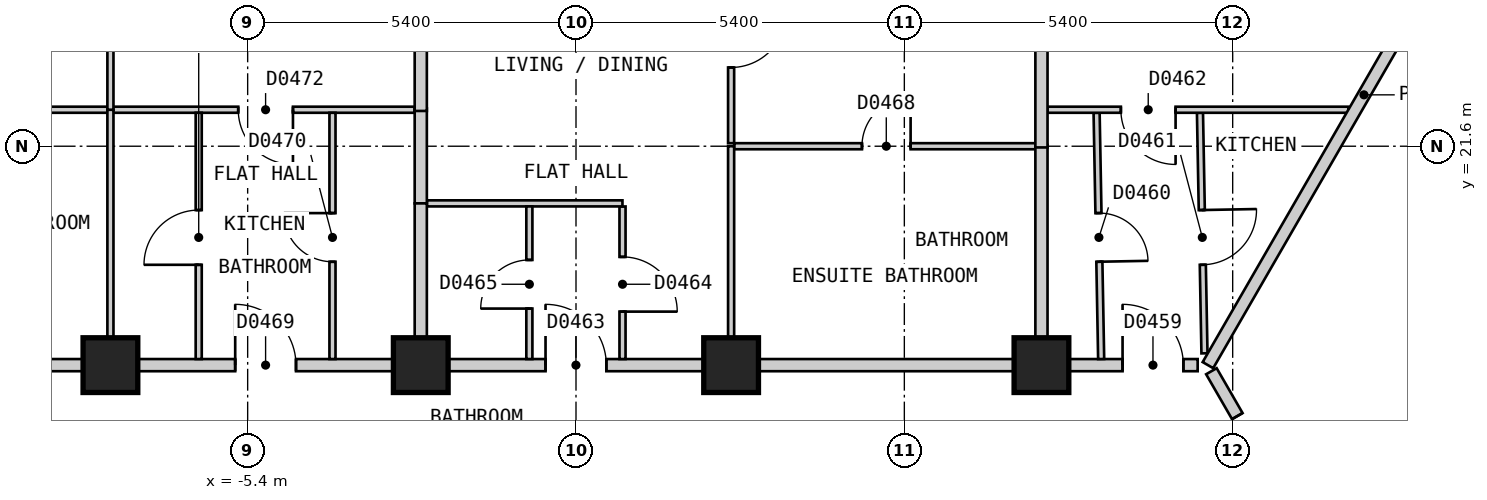
"""IFC4 building model, lengths in metres.
Left out: names, types, materials, properties, quantities, classifications, styles, units other than length and angle.
Written with IfcOpenShell. Run it as: python <this file> out.ifc"""

import sys

from ifc_helpers import new_model, si_unit, direction, frame, frame_2d, origin, origin_2d, place, context, subcontext, project, spatial, rectangle, extrude, element, fill, save


model = new_model("IFC4")
c1 = context("Model", 3, precision=1e-05, world=origin(), true_north=direction((0.0, 1.0)))
c2 = subcontext(c1, "Body", "Model", "MODEL_VIEW")
j1 = project(units=[si_unit("LENGTHUNIT", "METRE"), si_unit("PLANEANGLEUNIT", "RADIAN")], contexts=[c1])
p1 = place(None, origin())
s1 = spatial("IfcSite", under=j1, at=p1, CompositionType="ELEMENT")
p2 = place(p1, origin())
s2 = spatial("IfcBuilding", under=s1, at=p2, CompositionType="ELEMENT")
p3 = place(p2, frame((0.0, 0.0, 26.4)))
s3 = spatial("IfcBuildingStorey", under=s2, at=p3, CompositionType="ELEMENT", Elevation=26.4)
for number, where, z_axis, x_axis in (
    (1, (7.655, 18.0, 0.0), (0.0, 0.0, 1.0), (-1.0, 0.0, 0.0)),
    (2, (2.551, 18.0, 0.0), (0.0, 0.0, 1.0), (-1.0, 0.0, 0.0)),
    (3, (-2.553, 18.0, 0.0), (0.0, 0.0, 1.0), (-1.0, 0.0, 0.0)),
    (4, (-7.657, 18.0, 0.0), (0.0, 0.0, 1.0), (-1.0, 0.0, 0.0)),
):
    element("IfcColumn", number, at=place(p3, frame(where, z_axis=z_axis, x_axis=x_axis)), inside=s3, PredefinedType="COLUMN", context=c2, shape_type="SweptSolid", body=[
        extrude(rectangle(XDim=0.9, YDim=0.9, at=origin_2d()), origin(), (0.0, 0.0, 1.0), 3.0),
    ])
p4 = place(p3, frame((10.45, 17.9, 0.0), z_axis=(0.0, 0.0, 1.0), x_axis=(0.500034352617, -0.866005569383, 0.0)))
e5 = element("IfcWall", 5, at=p4, inside=s3, PredefinedType="PARTITIONING", context=c2, shape_type="SweptSolid", body=[
    extrude(rectangle(XDim=20.553, YDim=0.2, at=frame_2d((10.276, 0.0))), origin(), (0.0, 0.0, 1.0), 2.7),
])
p5 = place(p4, frame((9.775, 0.0, 0.0)))
e6 = element("IfcOpeningElement", 6, at=p5, cuts=e5, PredefinedType="OPENING", context=c2, shape_type="SweptSolid", body=[
    extrude(rectangle(XDim=1.0, YDim=2.1, at=frame_2d((0.5, 1.05))), frame((0.0, 0.11, 0.0), z_axis=(0.0, -1.0, 0.0), x_axis=(1.0, 0.0, 0.0)), (0.0, 0.0, 1.0), 0.22),
])
p6 = place(p4, frame((0.852, 0.0, 0.0)))
e7 = element("IfcOpeningElement", 7, at=p6, cuts=e5, PredefinedType="OPENING", context=c2, shape_type="SweptSolid", body=[
    extrude(rectangle(XDim=0.8, YDim=2.1, at=frame_2d((0.4, 1.05))), frame((0.0, 0.11, 0.0), z_axis=(0.0, -1.0, 0.0), x_axis=(1.0, 0.0, 0.0)), (0.0, 0.0, 1.0), 0.22),
])
p7 = place(p3, frame((-10.276, 18.0, 0.0), z_axis=(0.0, 0.0, 1.0), x_axis=(1.0, 0.0, 0.0)))
e8 = element("IfcWall", 8, at=p7, inside=s3, PredefinedType="PARTITIONING", context=c2, shape_type="SweptSolid", body=[
    extrude(rectangle(XDim=20.5, YDim=0.2, at=frame_2d((10.25, 0.0))), origin(), (0.0, 0.0, 1.0), 2.7),
])
p8 = place(p7, frame((19.265, 0.0, 0.0)))
e9 = element("IfcOpeningElement", 9, at=p8, cuts=e8, PredefinedType="OPENING", context=c2, shape_type="SweptSolid", body=[
    extrude(rectangle(XDim=1.0, YDim=2.1, at=frame_2d((0.5, 1.05))), frame((0.0, 0.11, 0.0), z_axis=(0.0, -1.0, 0.0), x_axis=(1.0, 0.0, 0.0)), (0.0, 0.0, 1.0), 0.22),
])
p9 = place(p7, frame((9.775, 0.0, 0.0)))
e10 = element("IfcOpeningElement", 10, at=p9, cuts=e8, PredefinedType="OPENING", context=c2, shape_type="SweptSolid", body=[
    extrude(rectangle(XDim=1.0, YDim=2.1, at=frame_2d((0.5, 1.05))), frame((0.0, 0.11, 0.0), z_axis=(0.0, -1.0, 0.0), x_axis=(1.0, 0.0, 0.0)), (0.0, 0.0, 1.0), 0.22),
])
p10 = place(p7, frame((4.671, 0.0, 0.0)))
e11 = element("IfcOpeningElement", 11, at=p10, cuts=e8, PredefinedType="OPENING", context=c2, shape_type="SweptSolid", body=[
    extrude(rectangle(XDim=1.0, YDim=2.1, at=frame_2d((0.5, 1.05))), frame((0.0, 0.11, 0.0), z_axis=(0.0, -1.0, 0.0), x_axis=(1.0, 0.0, 0.0)), (0.0, 0.0, 1.0), 0.22),
])
p11 = place(p3, frame((8.562, 22.15, 0.0), z_axis=(0.0, 0.0, 1.0), x_axis=(0.018504185939, -0.999828782894, 0.0)))
e12 = element("IfcWall", 12, at=p11, inside=s3, PredefinedType="PARTITIONING", context=c2, shape_type="SweptSolid", body=[
    extrude(rectangle(XDim=4.051, YDim=0.1, at=frame_2d((2.025, 0.0))), origin(), (0.0, 0.0, 1.0), 2.7),
])
p12 = place(p11, frame((1.65, 0.0, 0.0)))
e13 = element("IfcOpeningElement", 13, at=p12, cuts=e12, PredefinedType="OPENING", context=c2, shape_type="SweptSolid", body=[
    extrude(rectangle(XDim=0.8, YDim=2.1, at=frame_2d((0.4, 1.05))), frame((0.0, 0.06, 0.0), z_axis=(0.0, -1.0, 0.0), x_axis=(1.0, 0.0, 0.0)), (0.0, 0.0, 1.0), 0.12),
])
p13 = place(p3, frame((10.262, 22.15, 0.0), z_axis=(0.0, 0.0, 1.0), x_axis=(0.018696971826, -0.999825196344, 0.0)))
e14 = element("IfcWall", 14, at=p13, inside=s3, PredefinedType="PARTITIONING", context=c2, shape_type="SweptSolid", body=[
    extrude(rectangle(XDim=3.957, YDim=0.1, at=frame_2d((1.978, 0.0))), origin(), (0.0, 0.0, 1.0), 2.7),
])
p14 = place(p13, frame((1.6, 0.0, 0.0)))
e15 = element("IfcOpeningElement", 15, at=p14, cuts=e14, PredefinedType="OPENING", context=c2, shape_type="SweptSolid", body=[
    extrude(rectangle(XDim=0.9, YDim=2.1, at=frame_2d((0.45, 1.05))), frame((0.0, 0.06, 0.0), z_axis=(0.0, -1.0, 0.0), x_axis=(1.0, 0.0, 0.0)), (0.0, 0.0, 1.0), 0.12),
])
p15 = place(p3, frame((0.765, 20.609, 0.0), z_axis=(0.0, 0.0, 1.0), x_axis=(0.0, -1.0, 0.0)))
e16 = element("IfcWall", 16, at=p15, inside=s3, PredefinedType="PARTITIONING", context=c2, shape_type="SweptSolid", body=[
    extrude(rectangle(XDim=2.509, YDim=0.1, at=frame_2d((1.254, 0.0))), origin(), (0.0, 0.0, 1.0), 2.7),
])
p16 = place(p15, frame((0.829, 0.0, 0.0)))
e17 = element("IfcOpeningElement", 17, at=p16, cuts=e16, PredefinedType="OPENING", context=c2, shape_type="SweptSolid", body=[
    extrude(rectangle(XDim=0.9, YDim=2.1, at=frame_2d((0.45, 1.05))), frame((0.0, 0.06, 0.0), z_axis=(0.0, -1.0, 0.0), x_axis=(1.0, 0.0, 0.0)), (0.0, 0.0, 1.0), 0.12),
])
p17 = place(p3, frame((2.551, 25.04, 0.0), z_axis=(0.0, 0.0, 1.0), x_axis=(0.0, -1.0, 0.0)))
e18 = element("IfcWall", 18, at=p17, inside=s3, PredefinedType="PARTITIONING", context=c2, shape_type="SweptSolid", body=[
    extrude(rectangle(XDim=3.39, YDim=0.1, at=frame_2d((1.695, 0.0))), origin(), (0.0, 0.0, 1.0), 2.7),
])
p18 = place(p17, frame((1.245, 0.0, 0.0)))
e19 = element("IfcOpeningElement", 19, at=p18, cuts=e18, PredefinedType="OPENING", context=c2, shape_type="SweptSolid", body=[
    extrude(rectangle(XDim=0.9, YDim=2.1, at=frame_2d((0.45, 1.05))), frame((0.0, 0.06, 0.0), z_axis=(0.0, -1.0, 0.0), x_axis=(1.0, 0.0, 0.0)), (0.0, 0.0, 1.0), 0.12),
])
p19 = place(p3, frame((-2.453, 20.66, 0.0), z_axis=(0.0, 0.0, 1.0), x_axis=(1.0, 0.0, 0.0)))
e20 = element("IfcWall", 20, at=p19, inside=s3, PredefinedType="PARTITIONING", context=c2, shape_type="SweptSolid", body=[
    extrude(rectangle(XDim=3.217, YDim=0.1, at=frame_2d((1.608, 0.0))), origin(), (0.0, 0.0, 1.0), 2.7),
])
p20 = place(p3, frame((2.601, 21.6, 0.0), z_axis=(0.0, 0.0, 1.0), x_axis=(1.0, 0.0, 0.0)))
e21 = element("IfcWall", 21, at=p20, inside=s3, PredefinedType="PARTITIONING", context=c2, shape_type="SweptSolid", body=[
    extrude(rectangle(XDim=4.954, YDim=0.1, at=frame_2d((2.477, 0.0))), origin(), (0.0, 0.0, 1.0), 2.7),
])
p21 = place(p20, frame((2.102, 0.0, 0.0)))
e22 = element("IfcOpeningElement", 22, at=p21, cuts=e21, PredefinedType="OPENING", context=c2, shape_type="SweptSolid", body=[
    extrude(rectangle(XDim=0.8, YDim=2.1, at=frame_2d((0.4, 1.05))), frame((0.0, 0.06, 0.0), z_axis=(0.0, -1.0, 0.0), x_axis=(1.0, 0.0, 0.0)), (0.0, 0.0, 1.0), 0.12),
])
p22 = place(p3, frame((-12.711, 22.2, 0.0), z_axis=(0.0, 0.0, 1.0), x_axis=(1.0, 0.0, 0.0)))
e23 = element("IfcWall", 23, at=p22, inside=s3, PredefinedType="PARTITIONING", context=c2, shape_type="SweptSolid", body=[
    extrude(rectangle(XDim=10.058, YDim=0.1, at=frame_2d((5.029, 0.0))), origin(), (0.0, 0.0, 1.0), 2.7),
])
p23 = place(p22, frame((7.156, 0.0, 0.0)))
e24 = element("IfcOpeningElement", 24, at=p23, cuts=e23, PredefinedType="OPENING", context=c2, shape_type="SweptSolid", body=[
    extrude(rectangle(XDim=0.9, YDim=2.1, at=frame_2d((0.45, 1.05))), frame((0.0, 0.06, 0.0), z_axis=(0.0, -1.0, 0.0), x_axis=(1.0, 0.0, 0.0)), (0.0, 0.0, 1.0), 0.12),
])
p24 = place(p22, frame((2.102, 0.0, 0.0)))
e25 = element("IfcOpeningElement", 25, at=p24, cuts=e23, PredefinedType="OPENING", context=c2, shape_type="SweptSolid", body=[
    extrude(rectangle(XDim=0.8, YDim=2.1, at=frame_2d((0.4, 1.05))), frame((0.0, 0.06, 0.0), z_axis=(0.0, -1.0, 0.0), x_axis=(1.0, 0.0, 0.0)), (0.0, 0.0, 1.0), 0.12),
])
p25 = place(p3, frame((7.755, 22.2, 0.0), z_axis=(0.0, 0.0, 1.0), x_axis=(1.0, 0.0, 0.0)))
e26 = element("IfcWall", 26, at=p25, inside=s3, PredefinedType="PARTITIONING", context=c2, shape_type="SweptSolid", body=[
    extrude(rectangle(XDim=4.947, YDim=0.1, at=frame_2d((2.474, 0.0))), origin(), (0.0, 0.0, 1.0), 2.7),
])
p26 = place(p25, frame((1.206, 0.0, 0.0)))
e27 = element("IfcOpeningElement", 27, at=p26, cuts=e26, PredefinedType="OPENING", context=c2, shape_type="SweptSolid", body=[
    extrude(rectangle(XDim=0.9, YDim=2.1, at=frame_2d((0.45, 1.05))), frame((0.0, 0.06, 0.0), z_axis=(0.0, -1.0, 0.0), x_axis=(1.0, 0.0, 0.0)), (0.0, 0.0, 1.0), 0.12),
])
p27 = place(p3, frame((2.551, 18.1, 0.0), z_axis=(0.0, 0.0, 1.0), x_axis=(0.0, 1.0, 0.0)))
e28 = element("IfcWall", 28, at=p27, inside=s3, PredefinedType="PARTITIONING", context=c2, shape_type="SweptSolid", body=[
    extrude(rectangle(XDim=3.5, YDim=0.1, at=frame_2d((1.75, 0.0))), origin(), (0.0, 0.0, 1.0), 2.7),
])
p28 = place(p3, frame((-4.005, 18.1, 0.0), z_axis=(0.0, 0.0, 1.0), x_axis=(0.0, 1.0, 0.0)))
e29 = element("IfcWall", 29, at=p28, inside=s3, PredefinedType="PARTITIONING", context=c2, shape_type="SweptSolid", body=[
    extrude(rectangle(XDim=4.05, YDim=0.1, at=frame_2d((2.025, 0.0))), origin(), (0.0, 0.0, 1.0), 2.7),
])
p29 = place(p28, frame((1.6, 0.0, 0.0)))
e30 = element("IfcOpeningElement", 30, at=p29, cuts=e29, PredefinedType="OPENING", context=c2, shape_type="SweptSolid", body=[
    extrude(rectangle(XDim=0.8, YDim=2.1, at=frame_2d((0.4, 1.05))), frame((0.0, 0.06, 0.0), z_axis=(0.0, -1.0, 0.0), x_axis=(1.0, 0.0, 0.0)), (0.0, 0.0, 1.0), 0.12),
])
p30 = place(p3, frame((-6.205, 18.1, 0.0), z_axis=(0.0, 0.0, 1.0), x_axis=(0.0, 1.0, 0.0)))
e31 = element("IfcWall", 31, at=p30, inside=s3, PredefinedType="PARTITIONING", context=c2, shape_type="SweptSolid", body=[
    extrude(rectangle(XDim=4.05, YDim=0.1, at=frame_2d((2.025, 0.0))), origin(), (0.0, 0.0, 1.0), 2.7),
])
p31 = place(p30, frame((1.55, 0.0, 0.0)))
e32 = element("IfcOpeningElement", 32, at=p31, cuts=e31, PredefinedType="OPENING", context=c2, shape_type="SweptSolid", body=[
    extrude(rectangle(XDim=0.9, YDim=2.1, at=frame_2d((0.45, 1.05))), frame((0.0, 0.06, 0.0), z_axis=(0.0, -1.0, 0.0), x_axis=(1.0, 0.0, 0.0)), (0.0, 0.0, 1.0), 0.12),
])
p32 = place(p3, frame((-7.657, 18.1, 0.0), z_axis=(0.0, 0.0, 1.0), x_axis=(0.0, 1.0, 0.0)))
e33 = element("IfcWall", 33, at=p32, inside=s3, PredefinedType="PARTITIONING", context=c2, shape_type="SweptSolid", body=[
    extrude(rectangle(XDim=4.1, YDim=0.1, at=frame_2d((2.05, 0.0))), origin(), (0.0, 0.0, 1.0), 2.7),
])
p33 = place(p3, frame((-0.767, 18.1, 0.0), z_axis=(0.0, 0.0, 1.0), x_axis=(0.0, 1.0, 0.0)))
e34 = element("IfcWall", 34, at=p33, inside=s3, PredefinedType="PARTITIONING", context=c2, shape_type="SweptSolid", body=[
    extrude(rectangle(XDim=2.51, YDim=0.1, at=frame_2d((1.255, 0.0))), origin(), (0.0, 0.0, 1.0), 2.7),
])
p34 = place(p33, frame((0.83, 0.0, 0.0)))
e35 = element("IfcOpeningElement", 35, at=p34, cuts=e34, PredefinedType="OPENING", context=c2, shape_type="SweptSolid", body=[
    extrude(rectangle(XDim=0.8, YDim=2.1, at=frame_2d((0.4, 1.05))), frame((0.0, 0.06, 0.0), z_axis=(0.0, -1.0, 0.0), x_axis=(1.0, 0.0, 0.0)), (0.0, 0.0, 1.0), 0.12),
])
p35 = place(p3, frame((-2.553, 22.22, 0.0), z_axis=(0.0, 0.0, 1.0), x_axis=(0.0, -1.0, 0.0)))
e36 = element("IfcWall", 36, at=p35, inside=s3, PredefinedType="PARTITIONING", context=c2, shape_type="SweptSolid", body=[
    extrude(rectangle(XDim=1.56, YDim=0.2, at=frame_2d((0.78, 0.0))), origin(), (0.0, 0.0, 1.0), 2.7),
])
p36 = place(p3, frame((7.655, 21.62, 0.0), z_axis=(0.0, 0.0, 1.0), x_axis=(0.0, -1.0, 0.0)))
e37 = element("IfcWall", 37, at=p36, inside=s3, PredefinedType="PARTITIONING", context=c2, shape_type="SweptSolid", body=[
    extrude(rectangle(XDim=3.52, YDim=0.2, at=frame_2d((1.76, 0.0))), origin(), (0.0, 0.0, 1.0), 2.7),
])
p37 = place(p3, frame((10.393, 18.0, 0.0), z_axis=(0.0, 0.0, 1.0), x_axis=(0.499945497007, 0.866056868816, 0.0)))
e38 = element("IfcWall", 38, at=p37, inside=s3, PredefinedType="PARTITIONING", context=c2, shape_type="SweptSolid", body=[
    extrude(rectangle(XDim=10.265, YDim=0.2, at=frame_2d((5.132, 0.0))), origin(), (0.0, 0.0, 1.0), 2.7),
])
p38 = place(p3, frame((7.655, 21.58, 0.0), z_axis=(0.0, 0.0, 1.0), x_axis=(0.0, 1.0, 0.0)))
e39 = element("IfcWall", 39, at=p38, inside=s3, PredefinedType="PARTITIONING", context=c2, shape_type="SweptSolid", body=[
    extrude(rectangle(XDim=6.52, YDim=0.2, at=frame_2d((3.26, 0.0))), origin(), (0.0, 0.0, 1.0), 2.7),
])
p39 = place(p3, frame((-2.553, 18.1, 0.0), z_axis=(0.0, 0.0, 1.0), x_axis=(0.0, 1.0, 0.0)))
e40 = element("IfcWall", 40, at=p39, inside=s3, PredefinedType="PARTITIONING", context=c2, shape_type="SweptSolid", body=[
    extrude(rectangle(XDim=2.56, YDim=0.2, at=frame_2d((1.28, 0.0))), origin(), (0.0, 0.0, 1.0), 2.7),
])
p40 = place(p3, frame((-2.553, 22.18, 0.0), z_axis=(0.0, 0.0, 1.0), x_axis=(0.0, 1.0, 0.0)))
e41 = element("IfcWall", 41, at=p40, inside=s3, PredefinedType="PARTITIONING", context=c2, shape_type="SweptSolid", body=[
    extrude(rectangle(XDim=5.92, YDim=0.2, at=frame_2d((2.96, 0.0))), origin(), (0.0, 0.0, 1.0), 2.7),
])
p41 = place(p3, frame((11.847, 15.681, 0.0), z_axis=(0.0, 0.0, 1.0), x_axis=(0.866022959057, 0.500004234368, 0.0)))
e42 = element("IfcWall", 42, at=p41, inside=s3, PredefinedType="PARTITIONING", context=c2, shape_type="SweptSolid", body=[
    extrude(rectangle(XDim=10.0, YDim=0.2, at=frame_2d((5.0, 0.0))), origin(), (0.0, 0.0, 1.0), 2.7),
])
p42 = place(p3, frame((-7.657, 22.2, 0.0), z_axis=(0.0, 0.0, 1.0), x_axis=(0.0, 1.0, 0.0)))
e43 = element("IfcWall", 43, at=p42, inside=s3, PredefinedType="PARTITIONING", context=c2, shape_type="SweptSolid", body=[
    extrude(rectangle(XDim=5.9, YDim=0.1, at=frame_2d((2.95, 0.0))), origin(), (0.0, 0.0, 1.0), 2.7),
])
p43 = place(p42, frame((2.5, 0.0, 0.0)))
e44 = element("IfcOpeningElement", 44, at=p43, cuts=e43, PredefinedType="OPENING", context=c2, shape_type="SweptSolid", body=[
    extrude(rectangle(XDim=0.9, YDim=2.1, at=frame_2d((0.45, 1.05))), frame((0.0, 0.06, 0.0), z_axis=(0.0, -1.0, 0.0), x_axis=(1.0, 0.0, 0.0)), (0.0, 0.0, 1.0), 0.12),
])
p44 = place(p6, origin())
e45 = element("IfcDoor", 45, at=p44, inside=s3, OperationType="SINGLE_SWING_RIGHT", PredefinedType="DOOR", context=c2, shape_type="SweptSolid", body=[
    extrude(rectangle(XDim=0.8, YDim=2.1, at=frame_2d((0.4, 1.05))), frame((0.0, 0.025, 0.0), z_axis=(0.0, -1.0, 0.0), x_axis=(1.0, 0.0, 0.0)), (0.0, 0.0, 1.0), 0.05),
])
fill(e7, e45)
p45 = place(p8, origin())
e46 = element("IfcDoor", 46, at=p45, inside=s3, OperationType="SINGLE_SWING_LEFT", PredefinedType="DOOR", context=c2, shape_type="SweptSolid", body=[
    extrude(rectangle(XDim=1.0, YDim=2.1, at=frame_2d((0.5, 1.05))), frame((0.0, 0.025, 0.0), z_axis=(0.0, -1.0, 0.0), x_axis=(1.0, 0.0, 0.0)), (0.0, 0.0, 1.0), 0.05),
])
fill(e9, e46)
p46 = place(p12, origin())
e47 = element("IfcDoor", 47, at=p46, inside=s3, OperationType="SINGLE_SWING_RIGHT", PredefinedType="DOOR", context=c2, shape_type="SweptSolid", body=[
    extrude(rectangle(XDim=0.8, YDim=2.1, at=frame_2d((0.4, 1.05))), frame((0.0, 0.025, 0.0), z_axis=(0.0, -1.0, 0.0), x_axis=(1.0, 0.0, 0.0)), (0.0, 0.0, 1.0), 0.05),
])
fill(e13, e47)
p47 = place(p14, origin())
e48 = element("IfcDoor", 48, at=p47, inside=s3, OperationType="SINGLE_SWING_LEFT", PredefinedType="DOOR", context=c2, shape_type="SweptSolid", body=[
    extrude(rectangle(XDim=0.9, YDim=2.1, at=frame_2d((0.45, 1.05))), frame((0.0, 0.025, 0.0), z_axis=(0.0, -1.0, 0.0), x_axis=(1.0, 0.0, 0.0)), (0.0, 0.0, 1.0), 0.05),
])
fill(e15, e48)
p48 = place(p26, origin())
e49 = element("IfcDoor", 49, at=p48, inside=s3, OperationType="SINGLE_SWING_RIGHT", PredefinedType="DOOR", context=c2, shape_type="SweptSolid", body=[
    extrude(rectangle(XDim=0.9, YDim=2.1, at=frame_2d((0.45, 1.05))), frame((0.0, 0.025, 0.0), z_axis=(0.0, -1.0, 0.0), x_axis=(1.0, 0.0, 0.0)), (0.0, 0.0, 1.0), 0.05),
])
fill(e27, e49)
p49 = place(p9, origin())
e50 = element("IfcDoor", 50, at=p49, inside=s3, OperationType="SINGLE_SWING_LEFT", PredefinedType="DOOR", context=c2, shape_type="SweptSolid", body=[
    extrude(rectangle(XDim=1.0, YDim=2.1, at=frame_2d((0.5, 1.05))), frame((0.0, 0.025, 0.0), z_axis=(0.0, -1.0, 0.0), x_axis=(1.0, 0.0, 0.0)), (0.0, 0.0, 1.0), 0.05),
])
fill(e10, e50)
p50 = place(p16, origin())
e51 = element("IfcDoor", 51, at=p50, inside=s3, OperationType="SINGLE_SWING_RIGHT", PredefinedType="DOOR", context=c2, shape_type="SweptSolid", body=[
    extrude(rectangle(XDim=0.9, YDim=2.1, at=frame_2d((0.45, 1.05))), frame((0.0, 0.025, 0.0), z_axis=(0.0, -1.0, 0.0), x_axis=(1.0, 0.0, 0.0)), (0.0, 0.0, 1.0), 0.05),
])
fill(e17, e51)
p51 = place(p34, origin())
e52 = element("IfcDoor", 52, at=p51, inside=s3, OperationType="SINGLE_SWING_LEFT", PredefinedType="DOOR", context=c2, shape_type="SweptSolid", body=[
    extrude(rectangle(XDim=0.8, YDim=2.1, at=frame_2d((0.4, 1.05))), frame((0.0, 0.025, 0.0), z_axis=(0.0, -1.0, 0.0), x_axis=(1.0, 0.0, 0.0)), (0.0, 0.0, 1.0), 0.05),
])
fill(e35, e52)
p52 = place(p18, origin())
e53 = element("IfcDoor", 53, at=p52, inside=s3, OperationType="SINGLE_SWING_LEFT", PredefinedType="DOOR", context=c2, shape_type="SweptSolid", body=[
    extrude(rectangle(XDim=0.9, YDim=2.1, at=frame_2d((0.45, 1.05))), frame((0.0, 0.025, 0.0), z_axis=(0.0, -1.0, 0.0), x_axis=(1.0, 0.0, 0.0)), (0.0, 0.0, 1.0), 0.05),
])
fill(e19, e53)
p53 = place(p21, origin())
e54 = element("IfcDoor", 54, at=p53, inside=s3, OperationType="SINGLE_SWING_RIGHT", PredefinedType="DOOR", context=c2, shape_type="SweptSolid", body=[
    extrude(rectangle(XDim=0.8, YDim=2.1, at=frame_2d((0.4, 1.05))), frame((0.0, 0.025, 0.0), z_axis=(0.0, -1.0, 0.0), x_axis=(1.0, 0.0, 0.0)), (0.0, 0.0, 1.0), 0.05),
])
fill(e22, e54)
p54 = place(p10, origin())
e55 = element("IfcDoor", 55, at=p54, inside=s3, OperationType="SINGLE_SWING_LEFT", PredefinedType="DOOR", context=c2, shape_type="SweptSolid", body=[
    extrude(rectangle(XDim=1.0, YDim=2.1, at=frame_2d((0.5, 1.05))), frame((0.0, 0.025, 0.0), z_axis=(0.0, -1.0, 0.0), x_axis=(1.0, 0.0, 0.0)), (0.0, 0.0, 1.0), 0.05),
])
fill(e11, e55)
p55 = place(p29, origin())
e56 = element("IfcDoor", 56, at=p55, inside=s3, OperationType="SINGLE_SWING_RIGHT", PredefinedType="DOOR", context=c2, shape_type="SweptSolid", body=[
    extrude(rectangle(XDim=0.8, YDim=2.1, at=frame_2d((0.4, 1.05))), frame((0.0, 0.025, 0.0), z_axis=(0.0, -1.0, 0.0), x_axis=(1.0, 0.0, 0.0)), (0.0, 0.0, 1.0), 0.05),
])
fill(e30, e56)
p56 = place(p31, origin())
e57 = element("IfcDoor", 57, at=p56, inside=s3, OperationType="SINGLE_SWING_LEFT", PredefinedType="DOOR", context=c2, shape_type="SweptSolid", body=[
    extrude(rectangle(XDim=0.9, YDim=2.1, at=frame_2d((0.45, 1.05))), frame((0.0, 0.025, 0.0), z_axis=(0.0, -1.0, 0.0), x_axis=(1.0, 0.0, 0.0)), (0.0, 0.0, 1.0), 0.05),
])
fill(e32, e57)
p57 = place(p23, origin())
e58 = element("IfcDoor", 58, at=p57, inside=s3, OperationType="SINGLE_SWING_RIGHT", PredefinedType="DOOR", context=c2, shape_type="SweptSolid", body=[
    extrude(rectangle(XDim=0.9, YDim=2.1, at=frame_2d((0.45, 1.05))), frame((0.0, 0.025, 0.0), z_axis=(0.0, -1.0, 0.0), x_axis=(1.0, 0.0, 0.0)), (0.0, 0.0, 1.0), 0.05),
])
fill(e24, e58)
save(model, sys.argv[1])
